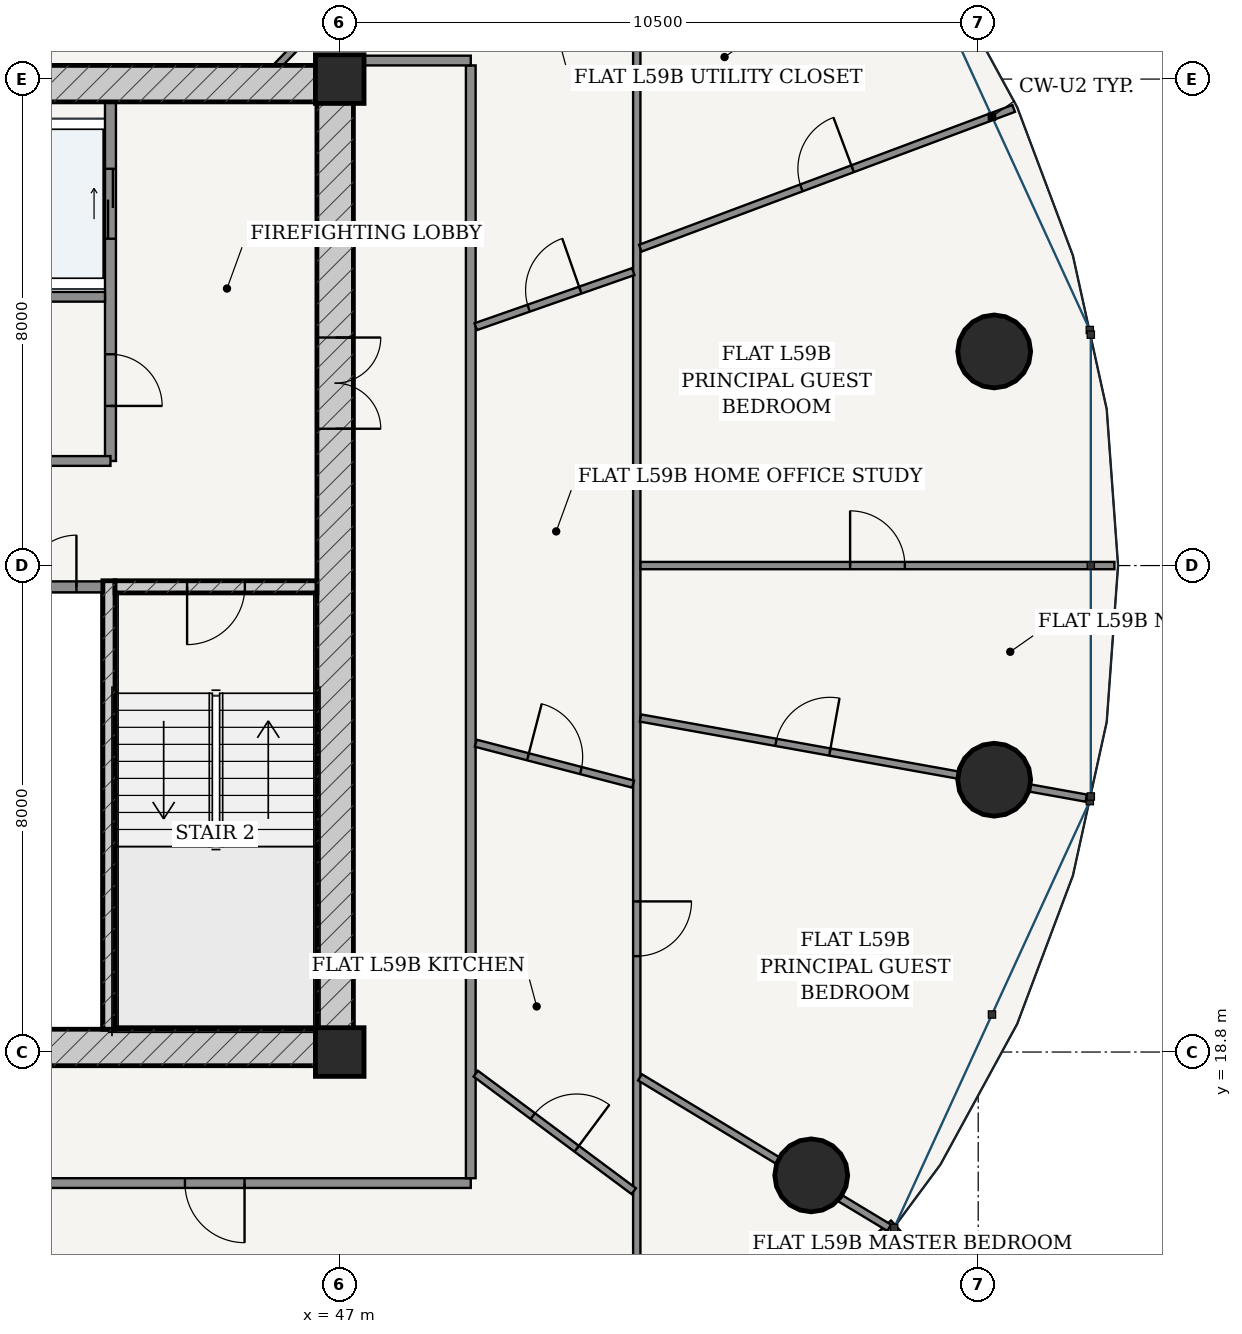
"""IFC4 building model, lengths in metres.
Left out: names, types, materials, properties, quantities, classifications, styles, units other than length and angle.
Written with IfcOpenShell. Run it as: python <this file> out.ifc"""

import sys

from ifc_helpers import new_model, si_unit, direction, frame, frame_2d, origin, origin_2d, place, context, subcontext, project, spatial, rectangle, hollow_circle, extrude, source, transform, mapped, element, fill, save


model = new_model("IFC4")
c1 = context("Model", 3, precision=1e-05, world=origin(), true_north=direction((-0.2419218956, 0.970295726276)))
c2 = subcontext(c1, "Body", "Model", "MODEL_VIEW")
j1 = project(units=[si_unit("LENGTHUNIT", "METRE"), si_unit("PLANEANGLEUNIT", "RADIAN")], contexts=[c1])
p1 = place(None, origin())
s1 = spatial("IfcSite", under=j1, at=p1, CompositionType="ELEMENT")
p2 = place(p1, origin())
s2 = spatial("IfcBuilding", under=s1, at=p2, CompositionType="ELEMENT")
p3 = place(p2, frame((0.0, 0.0, 224.5)))
s3 = spatial("IfcBuildingStorey", under=s2, at=p3, CompositionType="ELEMENT", Elevation=224.5)
for number, where, z_axis, x_axis in (
    (1, (47.0, 18.8, 0.0), (0.0, 0.0, 1.0), (1.0, 0.0, 0.0)),
    (2, (47.0, 34.8, 0.0), (0.0, 0.0, 1.0), (1.0, 0.0, 0.0)),
):
    element("IfcColumn", number, at=place(p3, frame(where, z_axis=z_axis, x_axis=x_axis)), inside=s3, PredefinedType="COLUMN", context=c2, shape_type="SweptSolid", body=[
        extrude(rectangle(XDim=0.8, YDim=0.8, at=origin_2d()), origin(), (0.0, 0.0, 1.0), 3.7),
    ])
p4 = place(p3, frame((28.775, 18.875, 0.0), z_axis=(0.0, 0.0, 1.0), x_axis=(1.0, 0.0, 0.0)))
e3 = element("IfcWall", 3, at=p4, inside=s3, PredefinedType="SHEAR", context=c2, shape_type="SweptSolid", body=[
    extrude(rectangle(XDim=18.45, YDim=0.6, at=frame_2d((9.225, 0.0))), origin(), (0.0, 0.0, 1.0), 3.435),
])
p5 = place(p4, frame((8.8, 0.0, 0.0)))
e4 = element("IfcOpeningElement", 4, at=p5, cuts=e3, PredefinedType="OPENING", context=c2, shape_type="SweptSolid", body=[
    extrude(rectangle(XDim=0.85, YDim=2.1, at=frame_2d((0.425, 1.05))), frame((0.0, 0.31, 0.0), z_axis=(0.0, -1.0, 0.0), x_axis=(1.0, 0.0, 0.0)), (0.0, 0.0, 1.0), 0.62),
])
p6 = place(p3, frame((28.775, 34.725, 0.0), z_axis=(0.0, 0.0, 1.0), x_axis=(1.0, 0.0, 0.0)))
e5 = element("IfcWall", 5, at=p6, inside=s3, PredefinedType="SHEAR", context=c2, shape_type="SweptSolid", body=[
    extrude(rectangle(XDim=18.45, YDim=0.6, at=frame_2d((9.225, 0.0))), origin(), (0.0, 0.0, 1.0), 3.435),
])
p7 = place(p3, frame((46.925, 19.175, 0.0), z_axis=(0.0, 0.0, 1.0), x_axis=(0.0, 1.0, 0.0)))
e6 = element("IfcWall", 6, at=p7, inside=s3, PredefinedType="SHEAR", context=c2, shape_type="SweptSolid", body=[
    extrude(rectangle(XDim=15.25, YDim=0.6, at=frame_2d((7.625, 0.0))), origin(), (0.0, 0.0, 1.0), 3.435),
])
p8 = place(p7, frame((9.875, 0.0, 0.0)))
e7 = element("IfcOpeningElement", 7, at=p8, cuts=e6, PredefinedType="OPENING", context=c2, shape_type="SweptSolid", body=[
    extrude(rectangle(XDim=1.5, YDim=2.2, at=frame_2d((0.75, 1.1))), frame((0.0, 0.31, 0.0), z_axis=(0.0, -1.0, 0.0), x_axis=(1.0, 0.0, 0.0)), (0.0, 0.0, 1.0), 0.62),
])
p9 = place(p3, frame((43.205, 19.175, 0.0), z_axis=(0.0, 0.0, 1.0), x_axis=(0.0, 1.0, 0.0)))
e8 = element("IfcWall", 8, at=p9, inside=s3, PredefinedType="SOLIDWALL", context=c2, shape_type="SweptSolid", body=[
    extrude(rectangle(XDim=7.375, YDim=0.2, at=frame_2d((3.688, 0.0))), origin(), (0.0, 0.0, 1.0), 3.435),
])
p10 = place(p3, frame((43.305, 26.45, 0.0), z_axis=(0.0, 0.0, 1.0), x_axis=(1.0, 0.0, 0.0)))
e9 = element("IfcWall", 9, at=p10, inside=s3, PredefinedType="SOLIDWALL", context=c2, shape_type="SweptSolid", body=[
    extrude(rectangle(XDim=3.32, YDim=0.2, at=frame_2d((1.66, 0.0))), origin(), (0.0, 0.0, 1.0), 3.435),
])
p11 = place(p10, frame((1.185, 0.0, 0.0)))
e10 = element("IfcOpeningElement", 10, at=p11, cuts=e9, PredefinedType="OPENING", context=c2, shape_type="SweptSolid", body=[
    extrude(rectangle(XDim=0.95, YDim=2.15, at=frame_2d((0.475, 1.075))), frame((0.0, 0.11, 0.0), z_axis=(0.0, -1.0, 0.0), x_axis=(1.0, 0.0, 0.0)), (0.0, 0.0, 1.0), 0.22),
])
for number, where, z_axis, x_axis in (
    (11, (57.763, 30.321, 0.0), (0.0, 0.0, 1.0), (1.0, 0.0, 0.0)),
    (12, (54.754, 16.772, 0.0), (0.0, 0.0, 1.0), (1.0, 0.0, 0.0)),
    (13, (57.763, 23.279, 0.0), (0.0, 0.0, 1.0), (1.0, 0.0, 0.0)),
):
    element("IfcColumn", number, at=place(p3, frame(where, z_axis=z_axis, x_axis=x_axis)), inside=s3, PredefinedType="COLUMN", context=c2, shape_type="SweptSolid", body=[
        extrude(hollow_circle(Radius=0.6, WallThickness=0.038, at=origin_2d()), origin(), (0.0, 0.0, 1.0), 3.7),
    ])
p12 = place(p3, frame((50.035, 10.391, 0.0), z_axis=(0.0, 0.0, 1.0), x_axis=(0.741986838603, 0.670414447443, 0.0)))
e14 = element("IfcWall", 14, at=p12, inside=s3, PredefinedType="SOLIDWALL", context=c2, shape_type="SweptSolid", body=[
    extrude(rectangle(XDim=8.255, YDim=0.28, at=frame_2d((4.127, 0.0))), origin(), (0.0, 0.0, 1.0), 3.435),
])
p13 = place(p12, frame((1.179, 0.0, 0.85)))
e15 = element("IfcOpeningElement", 15, at=p13, cuts=e14, PredefinedType="OPENING", context=c2, shape_type="SweptSolid", body=[
    extrude(rectangle(XDim=2.1, YDim=1.95, at=frame_2d((1.05, 0.975))), frame((0.0, 0.15, 0.0), z_axis=(0.0, -1.0, 0.0), x_axis=(1.0, 0.0, 0.0)), (0.0, 0.0, 1.0), 0.3),
])
p14 = place(p12, frame((4.976, 0.0, 0.85)))
e16 = element("IfcOpeningElement", 16, at=p14, cuts=e14, PredefinedType="OPENING", context=c2, shape_type="SweptSolid", body=[
    extrude(rectangle(XDim=2.1, YDim=1.95, at=frame_2d((1.05, 0.975))), frame((0.0, 0.15, 0.0), z_axis=(0.0, -1.0, 0.0), x_axis=(1.0, 0.0, 0.0)), (0.0, 0.0, 1.0), 0.3),
])
p15 = place(p3, frame((41.39, 26.45, 0.0), z_axis=(0.0, 0.0, 1.0), x_axis=(1.0, 0.0, 0.0)))
e17 = element("IfcWall", 17, at=p15, inside=s3, PredefinedType="PARTITIONING", context=c2, shape_type="SweptSolid", body=[
    extrude(rectangle(XDim=1.71, YDim=0.18, at=frame_2d((0.855, 0.0))), origin(), (0.0, 0.0, 1.0), 3.435),
])
p16 = place(p15, frame((0.43, 0.0, 0.0)))
e18 = element("IfcOpeningElement", 18, at=p16, cuts=e17, PredefinedType="OPENING", context=c2, shape_type="SweptSolid", body=[
    extrude(rectangle(XDim=0.85, YDim=2.1, at=frame_2d((0.425, 1.05))), frame((0.0, 0.1, 0.0), z_axis=(0.0, -1.0, 0.0), x_axis=(1.0, 0.0, 0.0)), (0.0, 0.0, 1.0), 0.2),
])
p17 = place(p3, frame((43.23, 28.52, 0.0), z_axis=(0.0, 0.0, 1.0), x_axis=(0.0, 1.0, 0.0)))
e19 = element("IfcWall", 19, at=p17, inside=s3, PredefinedType="PARTITIONING", context=c2, shape_type="SweptSolid", body=[
    extrude(rectangle(XDim=5.905, YDim=0.18, at=frame_2d((2.953, 0.0))), origin(), (0.0, 0.0, 1.0), 3.435),
])
p18 = place(p17, frame((0.905, 0.0, 0.0)))
e20 = element("IfcOpeningElement", 20, at=p18, cuts=e19, PredefinedType="OPENING", context=c2, shape_type="SweptSolid", body=[
    extrude(rectangle(XDim=0.85, YDim=2.1, at=frame_2d((0.425, 1.05))), frame((0.0, 0.1, 0.0), z_axis=(0.0, -1.0, 0.0), x_axis=(1.0, 0.0, 0.0)), (0.0, 0.0, 1.0), 0.2),
])
p19 = place(p17, frame((3.655, 0.0, 0.0)))
e21 = element("IfcOpeningElement", 21, at=p19, cuts=e19, PredefinedType="OPENING", context=c2, shape_type="SweptSolid", body=[
    extrude(rectangle(XDim=1.15, YDim=2.2, at=frame_2d((0.575, 1.1))), frame((0.0, 0.1, 0.0), z_axis=(0.0, -1.0, 0.0), x_axis=(1.0, 0.0, 0.0)), (0.0, 0.0, 1.0), 0.2),
])
p20 = place(p3, frame((41.39, 31.22, 0.0), z_axis=(0.0, 0.0, 1.0), x_axis=(1.0, 0.0, 0.0)))
e22 = element("IfcWall", 22, at=p20, inside=s3, PredefinedType="PARTITIONING", context=c2, shape_type="SweptSolid", body=[
    extrude(rectangle(XDim=1.75, YDim=0.16, at=frame_2d((0.875, 0.0))), origin(), (0.0, 0.0, 1.0), 3.435),
])
p21 = place(p3, frame((41.39, 28.52, 0.0), z_axis=(0.0, 0.0, 1.0), x_axis=(1.0, 0.0, 0.0)))
e23 = element("IfcWall", 23, at=p21, inside=s3, PredefinedType="PARTITIONING", context=c2, shape_type="SweptSolid", body=[
    extrude(rectangle(XDim=1.84, YDim=0.16, at=frame_2d((0.92, 0.0))), origin(), (0.0, 0.0, 1.0), 3.435),
])
p22 = place(p3, frame((34.32, 16.645, 0.0), z_axis=(0.0, 0.0, 1.0), x_axis=(1.0, 0.0, 0.0)))
e24 = element("IfcWall", 24, at=p22, inside=s3, PredefinedType="PARTITIONING", context=c2, shape_type="SweptSolid", body=[
    extrude(rectangle(XDim=14.835, YDim=0.16, at=frame_2d((7.417, 0.0))), origin(), (0.0, 0.0, 1.0), 2.951),
])
p23 = place(p22, frame((10.135, 0.0, 0.0)))
e25 = element("IfcOpeningElement", 25, at=p23, cuts=e24, PredefinedType="OPENING", context=c2, shape_type="SweptSolid", body=[
    extrude(rectangle(XDim=0.98, YDim=2.2, at=frame_2d((0.49, 1.1))), frame((0.0, 0.09, 0.0), z_axis=(0.0, -1.0, 0.0), x_axis=(1.0, 0.0, 0.0)), (0.0, 0.0, 1.0), 0.18),
])
p24 = place(p3, frame((49.155, 16.725, 0.0), z_axis=(0.0, 0.0, 1.0), x_axis=(0.0, 1.0, 0.0)))
e26 = element("IfcWall", 26, at=p24, inside=s3, PredefinedType="PARTITIONING", context=c2, shape_type="SweptSolid", body=[
    extrude(rectangle(XDim=18.3, YDim=0.16, at=frame_2d((9.15, 0.0))), origin(), (0.0, 0.0, 1.0), 2.951),
])
p25 = place(p3, frame((47.225, 35.105, 0.0), z_axis=(0.0, 0.0, 1.0), x_axis=(1.0, 0.0, 0.0)))
e27 = element("IfcWall", 27, at=p25, inside=s3, PredefinedType="PARTITIONING", context=c2, shape_type="SweptSolid", body=[
    extrude(rectangle(XDim=1.93, YDim=0.16, at=frame_2d((0.965, 0.0))), origin(), (0.0, 0.0, 1.0), 3.435),
])
p26 = place(p3, frame((39.811, 35.027, 0.0), z_axis=(0.0, 0.0, 1.0), x_axis=(0.214966857327, 0.976621344356, 0.0)))
e28 = element("IfcWall", 28, at=p26, inside=s3, PredefinedType="PARTITIONING", context=c2, shape_type="SweptSolid", body=[
    extrude(rectangle(XDim=11.258, YDim=0.2, at=frame_2d((5.629, 0.0))), origin(), (0.0, 0.0, 1.0), 2.52),
])
p27 = place(p3, frame((51.885, 37.835, 0.0), z_axis=(0.0, 0.0, 1.0), x_axis=(0.0, -1.0, 0.0)))
e29 = element("IfcWall", 29, at=p27, inside=s3, PredefinedType="PARTITIONING", context=c2, shape_type="SweptSolid", body=[
    extrude(rectangle(XDim=23.92, YDim=0.12, at=frame_2d((11.96, 0.0))), origin(), (0.0, 0.0, 1.0), 2.951),
])
p28 = place(p27, frame((16.558, 0.0, 0.0)))
e30 = element("IfcOpeningElement", 30, at=p28, cuts=e29, PredefinedType="OPENING", context=c2, shape_type="SweptSolid", body=[
    extrude(rectangle(XDim=0.9, YDim=2.15, at=frame_2d((0.45, 1.075))), frame((0.0, 0.07, 0.0), z_axis=(0.0, -1.0, 0.0), x_axis=(1.0, 0.0, 0.0)), (0.0, 0.0, 1.0), 0.14),
])
p29 = place(p3, frame((51.938, 18.384, 0.0), z_axis=(0.0, 0.0, 1.0), x_axis=(0.856058483833, -0.516878972543, 0.0)))
e31 = element("IfcWall", 31, at=p29, inside=s3, PredefinedType="PARTITIONING", context=c2, shape_type="SweptSolid", body=[
    extrude(rectangle(XDim=4.787, YDim=0.12, at=frame_2d((2.393, 0.0))), origin(), (0.0, 0.0, 1.0), 2.951),
])
p30 = place(p3, frame((51.946, 24.293, 0.0), z_axis=(0.0, 0.0, 1.0), x_axis=(0.984227185588, -0.176909149424, 0.0)))
e32 = element("IfcWall", 32, at=p30, inside=s3, PredefinedType="PARTITIONING", context=c2, shape_type="SweptSolid", body=[
    extrude(rectangle(XDim=7.448, YDim=0.12, at=frame_2d((3.724, 0.0))), origin(), (0.0, 0.0, 1.0), 2.951),
])
p31 = place(p30, frame((2.264, 0.0, 0.0)))
e33 = element("IfcOpeningElement", 33, at=p31, cuts=e32, PredefinedType="OPENING", context=c2, shape_type="SweptSolid", body=[
    extrude(rectangle(XDim=0.9, YDim=2.15, at=frame_2d((0.45, 1.075))), frame((0.0, 0.07, 0.0), z_axis=(0.0, -1.0, 0.0), x_axis=(1.0, 0.0, 0.0)), (0.0, 0.0, 1.0), 0.14),
])
p32 = place(p3, frame((51.947, 26.8, 0.0), z_axis=(0.0, 0.0, 1.0), x_axis=(1.0, 0.0, 0.0)))
e34 = element("IfcWall", 34, at=p32, inside=s3, PredefinedType="PARTITIONING", context=c2, shape_type="SweptSolid", body=[
    extrude(rectangle(XDim=7.793, YDim=0.12, at=frame_2d((3.896, 0.0))), origin(), (0.0, 0.0, 1.0), 2.951),
])
p33 = place(p32, frame((3.447, 0.0, 0.0)))
e35 = element("IfcOpeningElement", 35, at=p33, cuts=e34, PredefinedType="OPENING", context=c2, shape_type="SweptSolid", body=[
    extrude(rectangle(XDim=0.9, YDim=2.15, at=frame_2d((0.45, 1.075))), frame((0.0, 0.07, 0.0), z_axis=(0.0, -1.0, 0.0), x_axis=(1.0, 0.0, 0.0)), (0.0, 0.0, 1.0), 0.14),
])
p34 = place(p3, frame((51.943, 32.019, 0.0), z_axis=(0.0, 0.0, 1.0), x_axis=(0.936540194592, 0.350560214389, 0.0)))
e36 = element("IfcWall", 36, at=p34, inside=s3, PredefinedType="PARTITIONING", context=c2, shape_type="SweptSolid", body=[
    extrude(rectangle(XDim=6.556, YDim=0.12, at=frame_2d((3.278, 0.0))), origin(), (0.0, 0.0, 1.0), 2.951),
])
p35 = place(p34, frame((2.828, 0.0, 0.0)))
e37 = element("IfcOpeningElement", 37, at=p35, cuts=e36, PredefinedType="OPENING", context=c2, shape_type="SweptSolid", body=[
    extrude(rectangle(XDim=0.9, YDim=2.15, at=frame_2d((0.45, 1.075))), frame((0.0, 0.07, 0.0), z_axis=(0.0, -1.0, 0.0), x_axis=(1.0, 0.0, 0.0)), (0.0, 0.0, 1.0), 0.14),
])
p36 = place(p3, frame((49.237, 18.444, 0.0), z_axis=(0.0, 0.0, 1.0), x_axis=(0.802454010275, -0.596713969497, 0.0)))
e38 = element("IfcWall", 38, at=p36, inside=s3, PredefinedType="PARTITIONING", context=c2, shape_type="SweptSolid", body=[
    extrude(rectangle(XDim=3.238, YDim=0.12, at=frame_2d((1.619, 0.0))), origin(), (0.0, 0.0, 1.0), 3.11),
])
p37 = place(p36, frame((1.169, 0.0, 0.0)))
e39 = element("IfcOpeningElement", 39, at=p37, cuts=e38, PredefinedType="OPENING", context=c2, shape_type="SweptSolid", body=[
    extrude(rectangle(XDim=0.9, YDim=2.15, at=frame_2d((0.45, 1.075))), frame((0.0, 0.07, 0.0), z_axis=(0.0, -1.0, 0.0), x_axis=(1.0, 0.0, 0.0)), (0.0, 0.0, 1.0), 0.14),
])
p38 = place(p3, frame((49.237, 23.879, 0.0), z_axis=(0.0, 0.0, 1.0), x_axis=(0.967822506788, -0.251633851765, 0.0)))
e40 = element("IfcWall", 40, at=p38, inside=s3, PredefinedType="PARTITIONING", context=c2, shape_type="SweptSolid", body=[
    extrude(rectangle(XDim=2.674, YDim=0.12, at=frame_2d((1.337, 0.0))), origin(), (0.0, 0.0, 1.0), 3.435),
])
p39 = place(p38, frame((0.887, 0.0, 0.0)))
e41 = element("IfcOpeningElement", 41, at=p39, cuts=e40, PredefinedType="OPENING", context=c2, shape_type="SweptSolid", body=[
    extrude(rectangle(XDim=0.9, YDim=2.15, at=frame_2d((0.45, 1.075))), frame((0.0, 0.07, 0.0), z_axis=(0.0, -1.0, 0.0), x_axis=(1.0, 0.0, 0.0)), (0.0, 0.0, 1.0), 0.14),
])
p40 = place(p3, frame((49.237, 30.729, 0.0), z_axis=(0.0, 0.0, 1.0), x_axis=(0.94398177501, 0.329997588549, 0.0)))
e42 = element("IfcWall", 42, at=p40, inside=s3, PredefinedType="PARTITIONING", context=c2, shape_type="SweptSolid", body=[
    extrude(rectangle(XDim=2.743, YDim=0.12, at=frame_2d((1.372, 0.0))), origin(), (0.0, 0.0, 1.0), 3.11),
])
p41 = place(p40, frame((0.922, 0.0, 0.0)))
e43 = element("IfcOpeningElement", 43, at=p41, cuts=e42, PredefinedType="OPENING", context=c2, shape_type="SweptSolid", body=[
    extrude(rectangle(XDim=0.9, YDim=2.15, at=frame_2d((0.45, 1.075))), frame((0.0, 0.07, 0.0), z_axis=(0.0, -1.0, 0.0), x_axis=(1.0, 0.0, 0.0)), (0.0, 0.0, 1.0), 0.14),
])
p42 = place(p3, frame((45.983, 35.026, 0.0), z_axis=(0.0, 0.0, 1.0), x_axis=(0.696410097703, 0.717644045344, 0.0)))
e44 = element("IfcWall", 44, at=p42, inside=s3, PredefinedType="PARTITIONING", context=c2, shape_type="SweptSolid", body=[
    extrude(rectangle(XDim=3.852, YDim=0.12, at=frame_2d((1.926, 0.0))), origin(), (0.0, 0.0, 1.0), 2.951),
])
p43 = place(p42, frame((1.496, 0.0, 0.0)))
e45 = element("IfcOpeningElement", 45, at=p43, cuts=e44, PredefinedType="OPENING", context=c2, shape_type="SweptSolid", body=[
    extrude(rectangle(XDim=0.86, YDim=2.15, at=frame_2d((0.43, 1.075))), frame((0.0, 0.07, 0.0), z_axis=(0.0, -1.0, 0.0), x_axis=(1.0, 0.0, 0.0)), (0.0, 0.0, 1.0), 0.14),
])
m1 = source(origin(), c2, "Body", "SweptSolid", [
    extrude(rectangle(XDim=1.5, YDim=2.2, at=frame_2d((0.75, 1.1))), frame((0.0, 0.025, 0.0), z_axis=(0.0, -1.0, 0.0), x_axis=(1.0, 0.0, 0.0)), (0.0, 0.0, 1.0), 0.05),
])
p44 = place(p8, frame((1.5, 0.0, 0.0), z_axis=(0.0, 0.0, 1.0), x_axis=(-1.0, 0.0, 0.0)))
e46 = element("IfcDoor", 46, at=p44, inside=s3, OperationType="DOUBLE_DOOR_SINGLE_SWING", PredefinedType="DOOR", context=c2, shape_type="MappedRepresentation", body=[
    mapped(m1, transform((0.0, 0.0, 0.0), scale=1.0)),
])
fill(e7, e46)
m2 = source(origin(), c2, "Body", "SweptSolid", [
    extrude(rectangle(XDim=0.95, YDim=2.15, at=frame_2d((0.475, 1.075))), frame((0.0, 0.025, 0.0), z_axis=(0.0, -1.0, 0.0), x_axis=(1.0, 0.0, 0.0)), (0.0, 0.0, 1.0), 0.05),
])
p45 = place(p11, frame((0.95, 0.0, 0.0), z_axis=(0.0, 0.0, 1.0), x_axis=(-1.0, 0.0, 0.0)))
e47 = element("IfcDoor", 47, at=p45, inside=s3, OperationType="SINGLE_SWING_RIGHT", PredefinedType="DOOR", context=c2, shape_type="MappedRepresentation", body=[
    mapped(m2, transform((0.0, 0.0, 0.0), scale=1.0)),
])
fill(e10, e47)
m3 = source(origin(), c2, "Body", "SweptSolid", [
    extrude(rectangle(XDim=0.85, YDim=2.1, at=frame_2d((0.425, 1.05))), frame((0.0, 0.025, 0.0), z_axis=(0.0, -1.0, 0.0), x_axis=(1.0, 0.0, 0.0)), (0.0, 0.0, 1.0), 0.05),
])
p46 = place(p16, origin())
e48 = element("IfcDoor", 48, at=p46, inside=s3, OperationType="SINGLE_SWING_RIGHT", PredefinedType="DOOR", context=c2, shape_type="MappedRepresentation", body=[
    mapped(m3, transform((0.0, 0.0, 0.0), scale=1.0)),
])
fill(e18, e48)
p47 = place(p18, frame((0.85, 0.0, 0.0), z_axis=(0.0, 0.0, 1.0), x_axis=(-1.0, 0.0, 0.0)))
e49 = element("IfcDoor", 49, at=p47, inside=s3, OperationType="SINGLE_SWING_RIGHT", PredefinedType="DOOR", context=c2, shape_type="MappedRepresentation", body=[
    mapped(m3, transform((0.0, 0.0, 0.0), scale=1.0)),
])
fill(e20, e49)
m4 = source(origin(), c2, "Body", "SweptSolid", [
    extrude(rectangle(XDim=1.15, YDim=2.2, at=frame_2d((0.575, 1.1))), frame((0.0, 0.025, 0.0), z_axis=(0.0, -1.0, 0.0), x_axis=(1.0, 0.0, 0.0)), (0.0, 0.0, 1.0), 0.05),
])
p48 = place(p19, origin())
e50 = element("IfcDoor", 50, at=p48, inside=s3, OperationType="DOUBLE_DOOR_SLIDING", PredefinedType="DOOR", context=c2, shape_type="MappedRepresentation", body=[
    mapped(m4, transform((0.0, 0.0, 0.0), scale=1.0)),
])
fill(e21, e50)
m5 = source(origin(), c2, "Body", "SweptSolid", [
    extrude(rectangle(XDim=0.98, YDim=2.2, at=frame_2d((0.49, 1.1))), frame((0.0, 0.025, 0.0), z_axis=(0.0, -1.0, 0.0), x_axis=(1.0, 0.0, 0.0)), (0.0, 0.0, 1.0), 0.05),
])
p49 = place(p23, frame((0.98, 0.0, 0.0), z_axis=(0.0, 0.0, 1.0), x_axis=(-1.0, 0.0, 0.0)))
e51 = element("IfcDoor", 51, at=p49, inside=s3, OperationType="SINGLE_SWING_LEFT", PredefinedType="DOOR", context=c2, shape_type="MappedRepresentation", body=[
    mapped(m5, transform((0.0, 0.0, 0.0), scale=1.0)),
])
fill(e25, e51)
m6 = source(origin(), c2, "Body", "SweptSolid", [
    extrude(rectangle(XDim=0.9, YDim=2.15, at=frame_2d((0.45, 1.075))), frame((0.0, 0.025, 0.0), z_axis=(0.0, -1.0, 0.0), x_axis=(1.0, 0.0, 0.0)), (0.0, 0.0, 1.0), 0.05),
])
p50 = place(p37, origin())
e52 = element("IfcDoor", 52, at=p50, inside=s3, OperationType="SINGLE_SWING_RIGHT", PredefinedType="DOOR", context=c2, shape_type="MappedRepresentation", body=[
    mapped(m6, transform((0.0, 0.0, 0.0), scale=1.0)),
])
fill(e39, e52)
p51 = place(p39, origin())
e53 = element("IfcDoor", 53, at=p51, inside=s3, OperationType="SINGLE_SWING_LEFT", PredefinedType="DOOR", context=c2, shape_type="MappedRepresentation", body=[
    mapped(m6, transform((0.0, 0.0, 0.0), scale=1.0)),
])
fill(e41, e53)
p52 = place(p41, origin())
e54 = element("IfcDoor", 54, at=p52, inside=s3, OperationType="SINGLE_SWING_RIGHT", PredefinedType="DOOR", context=c2, shape_type="MappedRepresentation", body=[
    mapped(m6, transform((0.0, 0.0, 0.0), scale=1.0)),
])
fill(e43, e54)
p53 = place(p28, origin())
e55 = element("IfcDoor", 55, at=p53, inside=s3, OperationType="SINGLE_SWING_LEFT", PredefinedType="DOOR", context=c2, shape_type="MappedRepresentation", body=[
    mapped(m6, transform((0.0, 0.0, 0.0), scale=1.0)),
])
fill(e30, e55)
p54 = place(p31, origin())
e56 = element("IfcDoor", 56, at=p54, inside=s3, OperationType="SINGLE_SWING_RIGHT", PredefinedType="DOOR", context=c2, shape_type="MappedRepresentation", body=[
    mapped(m6, transform((0.0, 0.0, 0.0), scale=1.0)),
])
fill(e33, e56)
p55 = place(p33, origin())
e57 = element("IfcDoor", 57, at=p55, inside=s3, OperationType="SINGLE_SWING_LEFT", PredefinedType="DOOR", context=c2, shape_type="MappedRepresentation", body=[
    mapped(m6, transform((0.0, 0.0, 0.0), scale=1.0)),
])
fill(e35, e57)
p56 = place(p35, origin())
e58 = element("IfcDoor", 58, at=p56, inside=s3, OperationType="SINGLE_SWING_RIGHT", PredefinedType="DOOR", context=c2, shape_type="MappedRepresentation", body=[
    mapped(m6, transform((0.0, 0.0, 0.0), scale=1.0)),
])
fill(e37, e58)
save(model, sys.argv[1])
